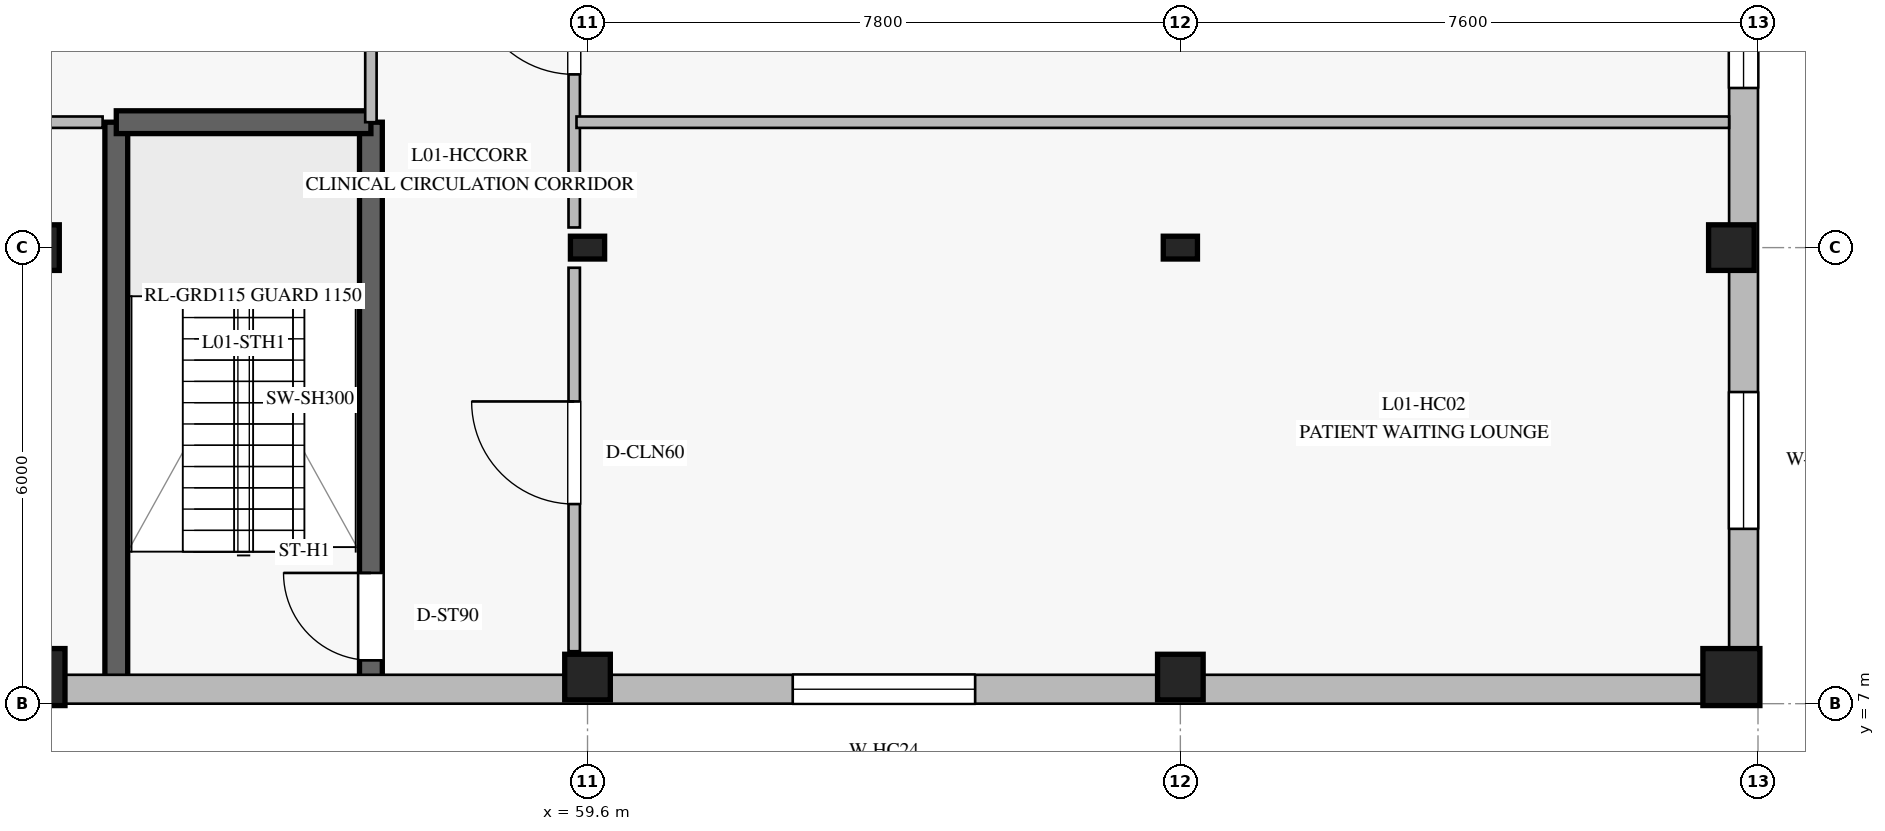
"""IFC4 building model, lengths in metres.
Left out: names, types, materials, properties, quantities, classifications, styles, units other than length and angle.
Written with IfcOpenShell. Run it as: python <this file> out.ifc"""

import sys

from ifc_helpers import new_model, si_unit, direction, frame, frame_2d, origin, origin_2d, place, context, subcontext, project, spatial, rectangle, i_section, extrude, element, fill, save


model = new_model("IFC4")
c1 = context("Model", 3, precision=1e-05, world=origin(), true_north=direction((0.0, 1.0)))
c2 = subcontext(c1, "Body", "Model", "MODEL_VIEW")
j1 = project(units=[si_unit("LENGTHUNIT", "METRE"), si_unit("PLANEANGLEUNIT", "RADIAN")], contexts=[c1])
p1 = place(None, origin())
s1 = spatial("IfcSite", under=j1, at=p1, CompositionType="ELEMENT")
p2 = place(p1, origin())
s2 = spatial("IfcBuilding", under=s1, at=p2, CompositionType="ELEMENT")
p3 = place(p2, frame((0.0, 0.0, 5.2)))
s3 = spatial("IfcBuildingStorey", under=s2, at=p3, CompositionType="ELEMENT", Elevation=5.2)
p4 = place(p3, frame((56.75, 7.35, 0.0), z_axis=(0.0, 0.0, 1.0), x_axis=(0.0, 1.0, 0.0)))
e1 = element("IfcWall", 1, at=p4, inside=s3, PredefinedType="SOLIDWALL", context=c2, shape_type="SweptSolid", body=[
    extrude(rectangle(XDim=7.3, YDim=0.3, at=frame_2d((3.65, 0.0))), origin(), (0.0, 0.0, 1.0), 4.34),
])
p5 = place(p4, frame((0.22, 0.0, 0.0)))
e2 = element("IfcOpeningElement", 2, at=p5, cuts=e1, PredefinedType="OPENING", context=c2, shape_type="SweptSolid", body=[
    extrude(rectangle(XDim=1.15, YDim=2.2, at=frame_2d((0.575, 1.1))), frame((0.0, 0.16, 0.0), z_axis=(0.0, -1.0, 0.0), x_axis=(1.0, 0.0, 0.0)), (0.0, 0.0, 1.0), 0.32),
])
p6 = place(p3, frame((53.4, 7.35, 0.0), z_axis=(0.0, 0.0, 1.0), x_axis=(0.0, 1.0, 0.0)))
e3 = element("IfcWall", 3, at=p6, inside=s3, PredefinedType="SOLIDWALL", context=c2, shape_type="SweptSolid", body=[
    extrude(rectangle(XDim=7.3, YDim=0.3, at=frame_2d((3.65, 0.0))), origin(), (0.0, 0.0, 1.0), 4.34),
])
p7 = place(p3, frame((53.4, 14.65, 0.0), z_axis=(0.0, 0.0, 1.0), x_axis=(1.0, 0.0, 0.0)))
e4 = element("IfcWall", 4, at=p7, inside=s3, PredefinedType="SOLIDWALL", context=c2, shape_type="SweptSolid", body=[
    extrude(rectangle(XDim=3.35, YDim=0.3, at=frame_2d((1.675, 0.0))), origin(), (0.0, 0.0, 1.0), 4.34),
])
p8 = place(p3, frame((52.35, 7.35, 0.0), z_axis=(0.0, 0.0, 1.0), x_axis=(1.0, 0.0, 0.0)))
e5 = element("IfcColumn", 5, at=p8, inside=s3, PredefinedType="COLUMN", context=c2, shape_type="SweptSolid", body=[
    extrude(rectangle(XDim=0.75, YDim=0.75, at=origin_2d()), origin(), (0.0, 0.0, 1.0), 4.6),
])
for number, where, z_axis, x_axis in (
    (6, (52.35, 13.0, 0.0), (0.0, 0.0, 1.0), (1.0, 0.0, 0.0)),
    (7, (59.6, 7.35, 0.0), (0.0, 0.0, 1.0), (1.0, 0.0, 0.0)),
):
    element("IfcColumn", number, at=place(p3, frame(where, z_axis=z_axis, x_axis=x_axis)), inside=s3, PredefinedType="COLUMN", context=c2, shape_type="SweptSolid", body=[
        extrude(rectangle(XDim=0.6, YDim=0.6, at=origin_2d()), origin(), (0.0, 0.0, 1.0), 4.6),
    ])
p9 = place(p3, frame((59.6, 13.0, 0.0), z_axis=(0.0, 0.0, 1.0), x_axis=(1.0, 0.0, 0.0)))
e8 = element("IfcColumn", 8, at=p9, inside=s3, PredefinedType="COLUMN", context=c2, shape_type="SweptSolid", body=[
    extrude(i_section(OverallWidth=0.3, OverallDepth=0.45, WebThickness=0.014, FlangeThickness=0.026, at=origin_2d()), origin(), (0.0, 0.0, 1.0), 4.6),
])
p10 = place(p3, frame((67.4, 7.35, 0.0), z_axis=(0.0, 0.0, 1.0), x_axis=(1.0, 0.0, 0.0)))
e9 = element("IfcColumn", 9, at=p10, inside=s3, PredefinedType="COLUMN", context=c2, shape_type="SweptSolid", body=[
    extrude(rectangle(XDim=0.6, YDim=0.6, at=origin_2d()), origin(), (0.0, 0.0, 1.0), 4.6),
])
p11 = place(p3, frame((67.4, 13.0, 0.0), z_axis=(0.0, 0.0, 1.0), x_axis=(1.0, 0.0, 0.0)))
e10 = element("IfcColumn", 10, at=p11, inside=s3, PredefinedType="COLUMN", context=c2, shape_type="SweptSolid", body=[
    extrude(i_section(OverallWidth=0.3, OverallDepth=0.45, WebThickness=0.014, FlangeThickness=0.026, at=origin_2d()), origin(), (0.0, 0.0, 1.0), 4.6),
])
p12 = place(p3, frame((74.65, 7.35, 0.0), z_axis=(0.0, 0.0, 1.0), x_axis=(1.0, 0.0, 0.0)))
e11 = element("IfcColumn", 11, at=p12, inside=s3, PredefinedType="COLUMN", context=c2, shape_type="SweptSolid", body=[
    extrude(rectangle(XDim=0.75, YDim=0.75, at=origin_2d()), origin(), (0.0, 0.0, 1.0), 4.6),
])
p13 = place(p3, frame((74.65, 13.0, 0.0), z_axis=(0.0, 0.0, 1.0), x_axis=(1.0, 0.0, 0.0)))
e12 = element("IfcColumn", 12, at=p13, inside=s3, PredefinedType="COLUMN", context=c2, shape_type="SweptSolid", body=[
    extrude(rectangle(XDim=0.6, YDim=0.6, at=origin_2d()), origin(), (0.0, 0.0, 1.0), 4.6),
])
p14 = place(p3, frame((75.0, 7.19, 0.0), z_axis=(0.0, 0.0, 1.0), x_axis=(-1.0, 0.0, 0.0)))
e13 = element("IfcWall", 13, at=p14, inside=s3, PredefinedType="STANDARD", context=c2, shape_type="SweptSolid", body=[
    extrude(rectangle(XDim=23.0, YDim=0.38, at=frame_2d((11.5, 0.0))), origin(), (0.0, 0.0, 1.0), 4.34),
])
p15 = place(p14, frame((10.3, 0.0, 0.95)))
e14 = element("IfcOpeningElement", 14, at=p15, cuts=e13, PredefinedType="OPENING", context=c2, shape_type="SweptSolid", body=[
    extrude(rectangle(XDim=2.4, YDim=1.8, at=frame_2d((1.2, 0.9))), frame((0.0, 0.2, 0.0), z_axis=(0.0, -1.0, 0.0), x_axis=(1.0, 0.0, 0.0)), (0.0, 0.0, 1.0), 0.4),
])
p16 = place(p3, frame((74.81, 42.62, 0.0), z_axis=(0.0, 0.0, 1.0), x_axis=(0.0, -1.0, 0.0)))
e15 = element("IfcWall", 15, at=p16, inside=s3, PredefinedType="STANDARD", context=c2, shape_type="SweptSolid", body=[
    extrude(rectangle(XDim=35.24, YDim=0.38, at=frame_2d((17.62, 0.0))), origin(), (0.0, 0.0, 1.0), 4.34),
])
p17 = place(p16, frame((31.52, 0.0, 0.9)))
e16 = element("IfcOpeningElement", 16, at=p17, cuts=e15, PredefinedType="OPENING", context=c2, shape_type="SweptSolid", body=[
    extrude(rectangle(XDim=1.8, YDim=1.8, at=frame_2d((0.9, 0.9))), frame((0.0, 0.2, 0.0), z_axis=(0.0, -1.0, 0.0), x_axis=(1.0, 0.0, 0.0)), (0.0, 0.0, 1.0), 0.4),
])
p18 = place(p16, frame((25.72, 0.0, 0.9)))
e17 = element("IfcOpeningElement", 17, at=p18, cuts=e15, PredefinedType="OPENING", context=c2, shape_type="SweptSolid", body=[
    extrude(rectangle(XDim=1.8, YDim=1.8, at=frame_2d((0.9, 0.9))), frame((0.0, 0.2, 0.0), z_axis=(0.0, -1.0, 0.0), x_axis=(1.0, 0.0, 0.0)), (0.0, 0.0, 1.0), 0.4),
])
p19 = place(p16, frame((19.72, 0.0, 0.9)))
e18 = element("IfcOpeningElement", 18, at=p19, cuts=e15, PredefinedType="OPENING", context=c2, shape_type="SweptSolid", body=[
    extrude(rectangle(XDim=1.8, YDim=1.8, at=frame_2d((0.9, 0.9))), frame((0.0, 0.2, 0.0), z_axis=(0.0, -1.0, 0.0), x_axis=(1.0, 0.0, 0.0)), (0.0, 0.0, 1.0), 0.4),
])
p20 = place(p16, frame((13.72, 0.0, 0.9)))
e19 = element("IfcOpeningElement", 19, at=p20, cuts=e15, PredefinedType="OPENING", context=c2, shape_type="SweptSolid", body=[
    extrude(rectangle(XDim=1.8, YDim=1.8, at=frame_2d((0.9, 0.9))), frame((0.0, 0.2, 0.0), z_axis=(0.0, -1.0, 0.0), x_axis=(1.0, 0.0, 0.0)), (0.0, 0.0, 1.0), 0.4),
])
p21 = place(p16, frame((7.72, 0.0, 0.9)))
e20 = element("IfcOpeningElement", 20, at=p21, cuts=e15, PredefinedType="OPENING", context=c2, shape_type="SweptSolid", body=[
    extrude(rectangle(XDim=1.8, YDim=1.8, at=frame_2d((0.9, 0.9))), frame((0.0, 0.2, 0.0), z_axis=(0.0, -1.0, 0.0), x_axis=(1.0, 0.0, 0.0)), (0.0, 0.0, 1.0), 0.4),
])
p22 = place(p16, frame((1.92, 0.0, 0.9)))
e21 = element("IfcOpeningElement", 21, at=p22, cuts=e15, PredefinedType="OPENING", context=c2, shape_type="SweptSolid", body=[
    extrude(rectangle(XDim=1.8, YDim=1.8, at=frame_2d((0.9, 0.9))), frame((0.0, 0.2, 0.0), z_axis=(0.0, -1.0, 0.0), x_axis=(1.0, 0.0, 0.0)), (0.0, 0.0, 1.0), 0.4),
])
p23 = place(p3, frame((56.75, 14.65, 0.0), z_axis=(0.0, 0.0, 1.0), x_axis=(0.0, 1.0, 0.0)))
e22 = element("IfcWall", 22, at=p23, inside=s3, PredefinedType="PARTITIONING", context=c2, shape_type="SweptSolid", body=[
    extrude(rectangle(XDim=20.7, YDim=0.15, at=frame_2d((10.35, 0.0))), origin(), (0.0, 0.0, 1.0), 4.34),
])
p24 = place(p23, frame((9.675, 0.0, 0.0)))
e23 = element("IfcOpeningElement", 23, at=p24, cuts=e22, PredefinedType="OPENING", context=c2, shape_type="SweptSolid", body=[
    extrude(rectangle(XDim=1.35, YDim=2.2, at=frame_2d((0.675, 1.1))), frame((0.0, 0.085, 0.0), z_axis=(0.0, -1.0, 0.0), x_axis=(1.0, 0.0, 0.0)), (0.0, 0.0, 1.0), 0.17),
])
p25 = place(p3, frame((59.425, 7.69, 0.0), z_axis=(0.0, 0.0, 1.0), x_axis=(0.0, 1.0, 0.0)))
e24 = element("IfcWall", 24, at=p25, inside=s3, PredefinedType="PARTITIONING", context=c2, shape_type="SweptSolid", body=[
    extrude(rectangle(XDim=5.045, YDim=0.15, at=frame_2d((2.522, 0.0))), origin(), (0.0, 0.0, 1.0), 3.98),
])
p26 = place(p25, frame((1.936, 0.0, 0.0)))
e25 = element("IfcOpeningElement", 25, at=p26, cuts=e24, PredefinedType="OPENING", context=c2, shape_type="SweptSolid", body=[
    extrude(rectangle(XDim=1.35, YDim=2.2, at=frame_2d((0.675, 1.1))), frame((0.0, 0.085, 0.0), z_axis=(0.0, -1.0, 0.0), x_axis=(1.0, 0.0, 0.0)), (0.0, 0.0, 1.0), 0.17),
])
p27 = place(p3, frame((59.425, 13.265, 0.0), z_axis=(0.0, 0.0, 1.0), x_axis=(0.0, 1.0, 0.0)))
e26 = element("IfcWall", 26, at=p27, inside=s3, PredefinedType="PARTITIONING", context=c2, shape_type="SweptSolid", body=[
    extrude(rectangle(XDim=4.535, YDim=0.15, at=frame_2d((2.268, 0.0))), origin(), (0.0, 0.0, 1.0), 3.98),
])
p28 = place(p27, frame((2.014, 0.0, 0.0)))
e27 = element("IfcOpeningElement", 27, at=p28, cuts=e26, PredefinedType="OPENING", context=c2, shape_type="SweptSolid", body=[
    extrude(rectangle(XDim=1.35, YDim=2.2, at=frame_2d((0.675, 1.1))), frame((0.0, 0.085, 0.0), z_axis=(0.0, -1.0, 0.0), x_axis=(1.0, 0.0, 0.0)), (0.0, 0.0, 1.0), 0.17),
])
p29 = place(p3, frame((52.38, 14.65, 0.0), z_axis=(0.0, 0.0, 1.0), x_axis=(1.0, 0.0, 0.0)))
e28 = element("IfcWall", 28, at=p29, inside=s3, PredefinedType="PARTITIONING", context=c2, shape_type="SweptSolid", body=[
    extrude(rectangle(XDim=0.84, YDim=0.15, at=frame_2d((0.42, 0.0))), origin(), (0.0, 0.0, 1.0), 3.98),
])
p30 = place(p3, frame((59.455, 14.65, 0.0), z_axis=(0.0, 0.0, 1.0), x_axis=(1.0, 0.0, 0.0)))
e29 = element("IfcWall", 29, at=p30, inside=s3, PredefinedType="PARTITIONING", context=c2, shape_type="SweptSolid", body=[
    extrude(rectangle(XDim=15.165, YDim=0.15, at=frame_2d((7.583, 0.0))), origin(), (0.0, 0.0, 1.0), 3.98),
])
p31 = place(p17, origin())
e30 = element("IfcWindow", 30, at=p31, inside=s3, PartitioningType="DOUBLE_PANEL_VERTICAL", PredefinedType="WINDOW", context=c2, shape_type="SweptSolid", body=[
    extrude(rectangle(XDim=1.8, YDim=1.8, at=frame_2d((0.9, 0.9))), frame((0.0, 0.03, 0.0), z_axis=(0.0, -1.0, 0.0), x_axis=(1.0, 0.0, 0.0)), (0.0, 0.0, 1.0), 0.06),
])
fill(e16, e30)
p32 = place(p18, origin())
e31 = element("IfcWindow", 31, at=p32, inside=s3, PartitioningType="DOUBLE_PANEL_VERTICAL", PredefinedType="WINDOW", context=c2, shape_type="SweptSolid", body=[
    extrude(rectangle(XDim=1.8, YDim=1.8, at=frame_2d((0.9, 0.9))), frame((0.0, 0.03, 0.0), z_axis=(0.0, -1.0, 0.0), x_axis=(1.0, 0.0, 0.0)), (0.0, 0.0, 1.0), 0.06),
])
fill(e17, e31)
p33 = place(p15, origin())
e32 = element("IfcWindow", 32, at=p33, inside=s3, PartitioningType="TRIPLE_PANEL_VERTICAL", PredefinedType="WINDOW", context=c2, shape_type="SweptSolid", body=[
    extrude(rectangle(XDim=2.4, YDim=1.8, at=frame_2d((1.2, 0.9))), frame((0.0, 0.03, 0.0), z_axis=(0.0, -1.0, 0.0), x_axis=(1.0, 0.0, 0.0)), (0.0, 0.0, 1.0), 0.06),
])
fill(e14, e32)
p34 = place(p5, origin())
e33 = element("IfcDoor", 33, at=p34, inside=s3, OperationType="SINGLE_SWING_RIGHT", PredefinedType="DOOR", context=c2, shape_type="SweptSolid", body=[
    extrude(rectangle(XDim=1.15, YDim=2.2, at=frame_2d((0.575, 1.1))), frame((0.0, 0.025, 0.0), z_axis=(0.0, -1.0, 0.0), x_axis=(1.0, 0.0, 0.0)), (0.0, 0.0, 1.0), 0.05),
])
fill(e2, e33)
p35 = place(p26, origin())
e34 = element("IfcDoor", 34, at=p35, inside=s3, OperationType="SINGLE_SWING_RIGHT", PredefinedType="DOOR", context=c2, shape_type="SweptSolid", body=[
    extrude(rectangle(XDim=1.35, YDim=2.2, at=frame_2d((0.675, 1.1))), frame((0.0, 0.025, 0.0), z_axis=(0.0, -1.0, 0.0), x_axis=(1.0, 0.0, 0.0)), (0.0, 0.0, 1.0), 0.05),
])
fill(e25, e34)
p36 = place(p28, origin())
e35 = element("IfcDoor", 35, at=p36, inside=s3, OperationType="SINGLE_SWING_RIGHT", PredefinedType="DOOR", context=c2, shape_type="SweptSolid", body=[
    extrude(rectangle(XDim=1.35, YDim=2.2, at=frame_2d((0.675, 1.1))), frame((0.0, 0.025, 0.0), z_axis=(0.0, -1.0, 0.0), x_axis=(1.0, 0.0, 0.0)), (0.0, 0.0, 1.0), 0.05),
])
fill(e27, e35)
save(model, sys.argv[1])
